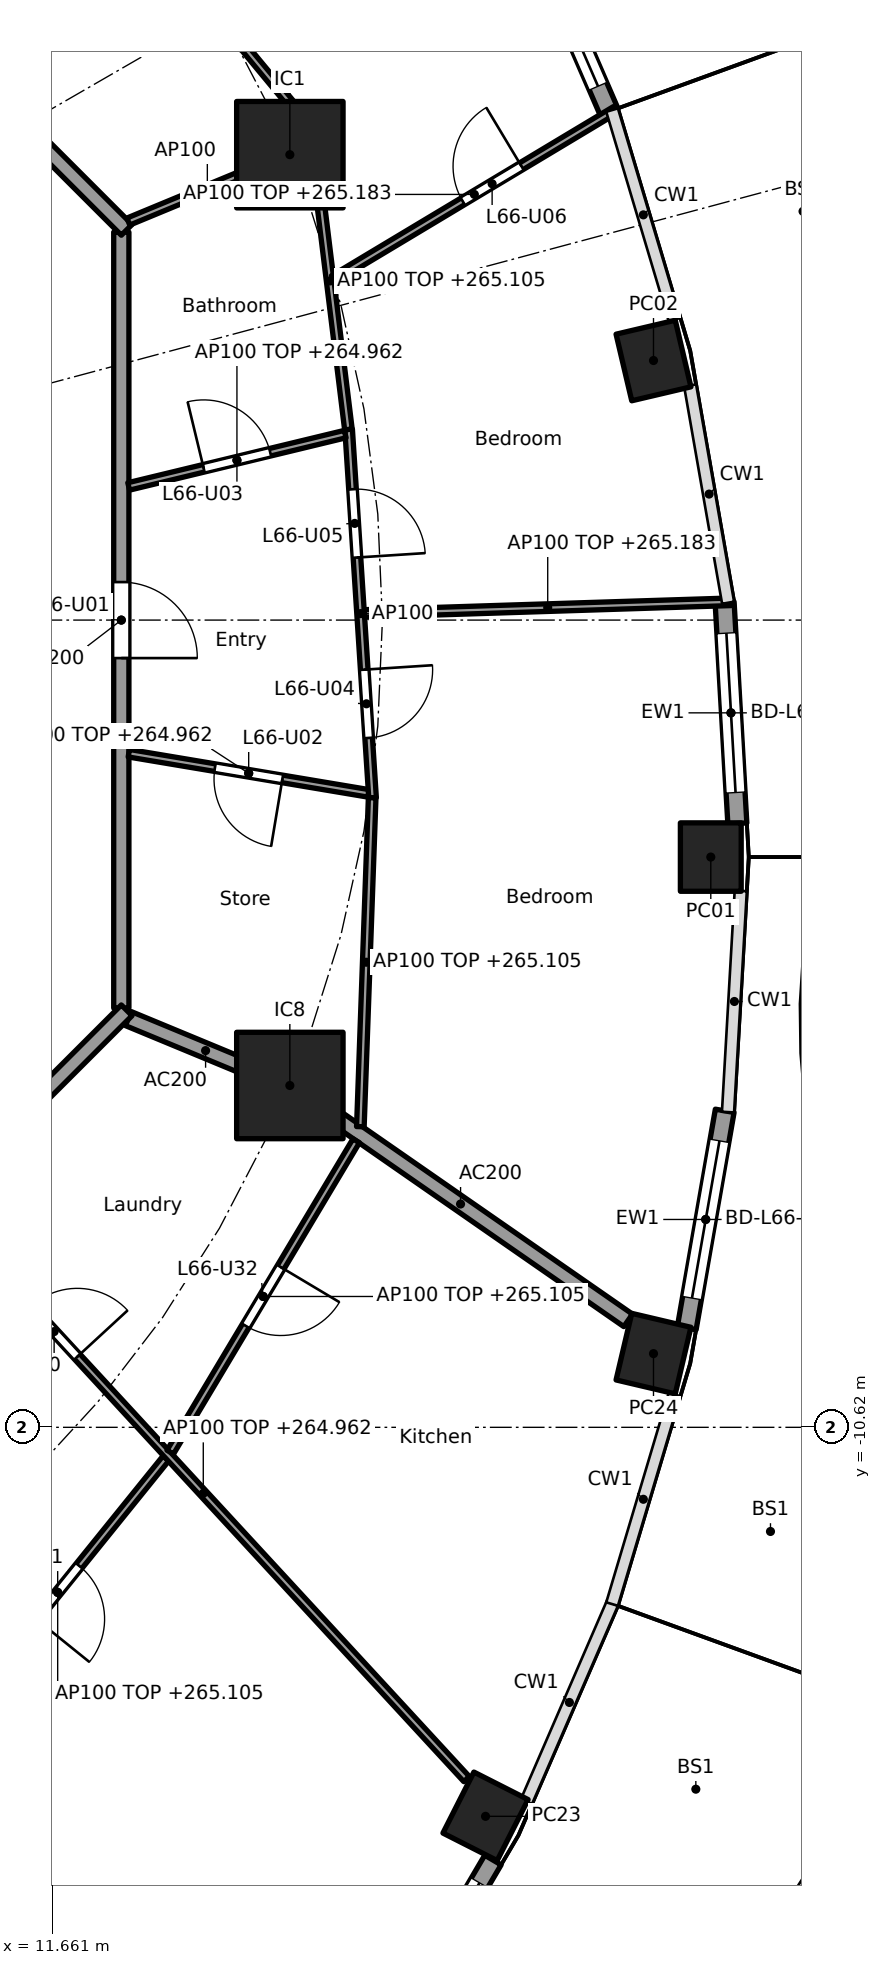
"""IFC4 building model, lengths in metres.
Left out: names, types, materials, properties, quantities, classifications, styles, units other than length and angle.
Written with IfcOpenShell. Run it as: python <this file> out.ifc"""

import sys

from ifc_helpers import new_model, si_unit, direction, frame, frame_2d, origin, origin_2d, place, context, subcontext, project, spatial, rectangle, hollow_rectangle, extrude, element, fill, save


model = new_model("IFC4")
c1 = context("Model", 3, precision=1e-05, world=origin(), true_north=direction((0.0, 1.0)))
c2 = subcontext(c1, "Body", "Model", "MODEL_VIEW")
j1 = project(units=[si_unit("LENGTHUNIT", "METRE"), si_unit("PLANEANGLEUNIT", "RADIAN")], contexts=[c1])
p1 = place(None, origin())
s1 = spatial("IfcSite", under=j1, at=p1, CompositionType="ELEMENT")
p2 = place(p1, origin())
s2 = spatial("IfcBuilding", under=s1, at=p2, CompositionType="ELEMENT")
p3 = place(p2, frame((0.0, 0.0, 262.2)))
s3 = spatial("IfcBuildingStorey", under=s2, at=p3, CompositionType="ELEMENT", Elevation=262.2)
for number, where, z_axis, x_axis in (
    (1, (20.32, -3.118, 0.0), (0.0, 0.0, 1.0), (0.0, 1.0, 0.0)),
    (2, (19.566, 3.415, 0.0), (0.0, 0.0, 1.0), (-0.229, 0.973, 0.0)),
    (3, (17.356, -15.738, 0.0), (0.0, 0.0, 1.0), (0.452, 0.892, 0.0)),
    (4, (19.566, -9.65, 0.0), (0.0, 0.0, 1.0), (0.229, 0.973, 0.0)),
):
    element("IfcColumn", number, at=place(p3, frame(where, z_axis=z_axis, x_axis=x_axis)), inside=s3, PredefinedType="COLUMN", context=c2, shape_type="SweptSolid", body=[
        extrude(hollow_rectangle(XDim=0.9, YDim=0.8, WallThickness=0.028, at=origin_2d()), origin(), (0.0, 0.0, 1.0), 3.7),
    ])
for number, where, z_axis, x_axis in (
    (5, (14.782, 6.123, 0.0), (0.0, 0.0, 1.0), (1.0, 0.0, 0.0)),
    (6, (14.782, -6.123, 0.0), (0.0, 0.0, 1.0), (1.0, 0.0, 0.0)),
):
    element("IfcColumn", number, at=place(p3, frame(where, z_axis=z_axis, x_axis=x_axis)), inside=s3, PredefinedType="COLUMN", context=c2, shape_type="SweptSolid", body=[
        extrude(rectangle(XDim=1.4, YDim=1.4, at=origin_2d()), origin(), (0.0, 0.0, 1.0), 3.7),
    ])
p4 = place(p3, frame((20.502, 0.235, 0.0), z_axis=(0.0, 0.0, 1.0), x_axis=(0.057533933376, -0.998343551344, 0.0)))
e7 = element("IfcWall", 7, at=p4, inside=s3, PredefinedType="SOLIDWALL", context=c2, shape_type="SweptSolid", body=[
    extrude(rectangle(XDim=2.915, YDim=0.25, at=frame_2d((1.458, 0.0))), origin(), (0.0, 0.0, 1.0), 3.44),
])
p5 = place(p4, frame((0.408, 0.0, 0.0)))
e8 = element("IfcOpeningElement", 8, at=p5, cuts=e7, PredefinedType="OPENING", context=c2, shape_type="SweptSolid", body=[
    extrude(rectangle(XDim=2.1, YDim=2.4, at=frame_2d((1.05, 1.2))), frame((0.0, 0.135, 0.0), z_axis=(0.0, -1.0, 0.0), x_axis=(1.0, 0.0, 0.0)), (0.0, 0.0, 1.0), 0.27),
])
p6 = place(p3, frame((17.854, 9.29, 0.0), z_axis=(0.0, 0.0, 1.0), x_axis=(0.397597791596, -0.9175598052, 0.0)))
e9 = element("IfcWall", 9, at=p6, inside=s3, PredefinedType="SOLIDWALL", context=c2, shape_type="SweptSolid", body=[
    extrude(rectangle(XDim=2.841, YDim=0.25, at=frame_2d((1.42, 0.0))), origin(), (0.0, 0.0, 1.0), 3.44),
])
p7 = place(p6, frame((0.371, 0.0, 0.0)))
e10 = element("IfcOpeningElement", 10, at=p7, cuts=e9, PredefinedType="OPENING", context=c2, shape_type="SweptSolid", body=[
    extrude(rectangle(XDim=2.1, YDim=2.4, at=frame_2d((1.05, 1.2))), frame((0.0, 0.135, 0.0), z_axis=(0.0, -1.0, 0.0), x_axis=(1.0, 0.0, 0.0)), (0.0, 0.0, 1.0), 0.27),
])
p8 = place(p3, frame((17.454, -16.312, 0.0), z_axis=(0.0, 0.0, 1.0), x_axis=(-0.506371364425, -0.862315511452, 0.0)))
e11 = element("IfcWall", 11, at=p8, inside=s3, PredefinedType="SOLIDWALL", context=c2, shape_type="SweptSolid", body=[
    extrude(rectangle(XDim=2.796, YDim=0.25, at=frame_2d((1.398, 0.0))), origin(), (0.0, 0.0, 1.0), 3.44),
])
p9 = place(p8, frame((0.348, 0.0, 0.0)))
e12 = element("IfcOpeningElement", 12, at=p9, cuts=e11, PredefinedType="OPENING", context=c2, shape_type="SweptSolid", body=[
    extrude(rectangle(XDim=2.1, YDim=2.4, at=frame_2d((1.05, 1.2))), frame((0.0, 0.135, 0.0), z_axis=(0.0, -1.0, 0.0), x_axis=(1.0, 0.0, 0.0)), (0.0, 0.0, 1.0), 0.27),
])
p10 = place(p3, frame((20.503, -6.456, 0.0), z_axis=(0.0, 0.0, 1.0), x_axis=(-0.172182411767, -0.985065082661, 0.0)))
e13 = element("IfcWall", 13, at=p10, inside=s3, PredefinedType="SOLIDWALL", context=c2, shape_type="SweptSolid", body=[
    extrude(rectangle(XDim=2.903, YDim=0.25, at=frame_2d((1.451, 0.0))), origin(), (0.0, 0.0, 1.0), 3.44),
])
p11 = place(p10, frame((0.401, 0.0, 0.0)))
e14 = element("IfcOpeningElement", 14, at=p11, cuts=e13, PredefinedType="OPENING", context=c2, shape_type="SweptSolid", body=[
    extrude(rectangle(XDim=2.1, YDim=2.4, at=frame_2d((1.05, 1.2))), frame((0.0, 0.135, 0.0), z_axis=(0.0, -1.0, 0.0), x_axis=(1.0, 0.0, 0.0)), (0.0, 0.0, 1.0), 0.27),
])
p12 = place(p3, frame((12.657, -5.243, 0.0), z_axis=(0.0, 0.0, 1.0), x_axis=(0.92383017907, -0.382802560388, 0.0)))
e15 = element("IfcWall", 15, at=p12, inside=s3, PredefinedType="PARTITIONING", context=c2, shape_type="SweptSolid", body=[
    extrude(rectangle(XDim=2.2, YDim=0.2, at=frame_2d((1.1, 0.0))), origin(), (0.0, 0.0, 1.0), 3.44),
])
p13 = place(p3, frame((14.823, -6.151, 0.0), z_axis=(0.0, 0.0, 1.0), x_axis=(0.821435065081, -0.570302054928, 0.0)))
e16 = element("IfcWall", 16, at=p13, inside=s3, PredefinedType="PARTITIONING", context=c2, shape_type="SweptSolid", body=[
    extrude(rectangle(XDim=5.368, YDim=0.2, at=frame_2d((2.684, 0.0))), origin(), (0.0, 0.0, 1.0), 3.44),
])
p14 = place(p3, frame((12.565, -5.104, 0.0), z_axis=(0.0, 0.0, 1.0), x_axis=(0.0, 1.0, 0.0)))
e17 = element("IfcWall", 17, at=p14, inside=s3, PredefinedType="PARTITIONING", context=c2, shape_type="SweptSolid", body=[
    extrude(rectangle(XDim=10.209, YDim=0.2, at=frame_2d((5.104, 0.0))), origin(), (0.0, 0.0, 1.0), 3.44),
])
p15 = place(p14, frame((4.604, 0.0, 0.0)))
e18 = element("IfcOpeningElement", 18, at=p15, cuts=e17, PredefinedType="OPENING", context=c2, shape_type="SweptSolid", body=[
    extrude(rectangle(XDim=1.0, YDim=2.1, at=frame_2d((0.5, 1.05))), frame((0.0, 0.11, 0.0), z_axis=(0.0, -1.0, 0.0), x_axis=(1.0, 0.0, 0.0)), (0.0, 0.0, 1.0), 0.22),
])
p16 = place(p3, frame((12.635, 5.134, 0.0), z_axis=(0.0, 0.0, 1.0), x_axis=(-0.707106781187, 0.707106781187, 0.0)))
e19 = element("IfcWall", 19, at=p16, inside=s3, PredefinedType="PARTITIONING", context=c2, shape_type="SweptSolid", body=[
    extrude(rectangle(XDim=10.609, YDim=0.2, at=frame_2d((5.305, 0.0))), origin(), (0.0, 0.0, 1.0), 3.44),
])
p17 = place(p3, frame((5.275, -12.494, 0.0), z_axis=(0.0, 0.0, 1.0), x_axis=(0.707106781187, 0.707106781187, 0.0)))
e20 = element("IfcWall", 20, at=p17, inside=s3, PredefinedType="PARTITIONING", context=c2, shape_type="SweptSolid", body=[
    extrude(rectangle(XDim=10.409, YDim=0.2, at=frame_2d((5.205, 0.0))), origin(), (0.0, 0.0, 1.0), 3.44),
])
p18 = place(p17, frame((4.604, 0.0, 0.0)))
e21 = element("IfcOpeningElement", 21, at=p18, cuts=e20, PredefinedType="OPENING", context=c2, shape_type="SweptSolid", body=[
    extrude(rectangle(XDim=1.0, YDim=2.1, at=frame_2d((0.5, 1.05))), frame((0.0, 0.11, 0.0), z_axis=(0.0, -1.0, 0.0), x_axis=(1.0, 0.0, 0.0)), (0.0, 0.0, 1.0), 0.22),
])
p19 = place(p3, frame((12.663, -1.751, 0.0), z_axis=(0.0, 0.0, 1.0), x_axis=(0.98626156497, -0.165191178529, 0.0)))
e22 = element("IfcWall", 22, at=p19, inside=s3, PredefinedType="PARTITIONING", context=c2, shape_type="SweptSolid", body=[
    extrude(rectangle(XDim=3.198, YDim=0.1, at=frame_2d((1.599, 0.0))), origin(), (0.0, 0.0, 1.0), 2.762),
])
p20 = place(p19, frame((1.149, 0.0, 0.0)))
e23 = element("IfcOpeningElement", 23, at=p20, cuts=e22, PredefinedType="OPENING", context=c2, shape_type="SweptSolid", body=[
    extrude(rectangle(XDim=0.9, YDim=2.1, at=frame_2d((0.45, 1.05))), frame((0.0, 0.06, 0.0), z_axis=(0.0, -1.0, 0.0), x_axis=(1.0, 0.0, 0.0)), (0.0, 0.0, 1.0), 0.12),
])
p21 = place(p3, frame((15.87, -2.338, 0.0), z_axis=(0.0, 0.0, 1.0), x_axis=(-0.064797294757, 0.997898447034, 0.0)))
e24 = element("IfcWall", 24, at=p21, inside=s3, PredefinedType="PARTITIONING", context=c2, shape_type="SweptSolid", body=[
    extrude(rectangle(XDim=4.857, YDim=0.1, at=frame_2d((2.428, 0.0))), origin(), (0.0, 0.0, 1.0), 3.44),
])
p22 = place(p21, frame((0.789, 0.0, 0.0)))
e25 = element("IfcOpeningElement", 25, at=p22, cuts=e24, PredefinedType="OPENING", context=c2, shape_type="SweptSolid", body=[
    extrude(rectangle(XDim=0.9, YDim=2.1, at=frame_2d((0.45, 1.05))), frame((0.0, 0.06, 0.0), z_axis=(0.0, -1.0, 0.0), x_axis=(1.0, 0.0, 0.0)), (0.0, 0.0, 1.0), 0.12),
])
p23 = place(p21, frame((3.167, 0.0, 0.0)))
e26 = element("IfcOpeningElement", 26, at=p23, cuts=e24, PredefinedType="OPENING", context=c2, shape_type="SweptSolid", body=[
    extrude(rectangle(XDim=0.9, YDim=2.1, at=frame_2d((0.45, 1.05))), frame((0.0, 0.06, 0.0), z_axis=(0.0, -1.0, 0.0), x_axis=(1.0, 0.0, 0.0)), (0.0, 0.0, 1.0), 0.12),
])
p24 = place(p3, frame((15.865, -2.338, 0.0), z_axis=(0.0, 0.0, 1.0), x_axis=(-0.035864509465, -0.999356661538, 0.0)))
e27 = element("IfcWall", 27, at=p24, inside=s3, PredefinedType="PARTITIONING", context=c2, shape_type="SweptSolid", body=[
    extrude(rectangle(XDim=4.329, YDim=0.1, at=frame_2d((2.165, 0.0))), origin(), (0.0, 0.0, 1.0), 2.905),
])
p25 = place(p3, frame((15.763, 0.087, 0.0), z_axis=(0.0, 0.0, 1.0), x_axis=(0.999492034598, 0.03186962151, 0.0)))
e28 = element("IfcWall", 28, at=p25, inside=s3, PredefinedType="PARTITIONING", context=c2, shape_type="SweptSolid", body=[
    extrude(rectangle(XDim=4.826, YDim=0.1, at=frame_2d((2.413, 0.0))), origin(), (0.0, 0.0, 1.0), 2.983),
])
p26 = place(p3, frame((12.662, 1.758, 0.0), z_axis=(0.0, 0.0, 1.0), x_axis=(0.972004827836, 0.234960879007, 0.0)))
e29 = element("IfcWall", 29, at=p26, inside=s3, PredefinedType="PARTITIONING", context=c2, shape_type="SweptSolid", body=[
    extrude(rectangle(XDim=2.93, YDim=0.1, at=frame_2d((1.465, 0.0))), origin(), (0.0, 0.0, 1.0), 2.762),
])
p27 = place(p26, frame((1.015, 0.0, 0.0)))
e30 = element("IfcOpeningElement", 30, at=p27, cuts=e29, PredefinedType="OPENING", context=c2, shape_type="SweptSolid", body=[
    extrude(rectangle(XDim=0.9, YDim=2.1, at=frame_2d((0.45, 1.05))), frame((0.0, 0.06, 0.0), z_axis=(0.0, -1.0, 0.0), x_axis=(1.0, 0.0, 0.0)), (0.0, 0.0, 1.0), 0.12),
])
p28 = place(p3, frame((15.552, 2.508, 0.0), z_axis=(0.0, 0.0, 1.0), x_axis=(-0.12196631785, 0.992534239868, 0.0)))
e31 = element("IfcWall", 31, at=p28, inside=s3, PredefinedType="PARTITIONING", context=c2, shape_type="SweptSolid", body=[
    extrude(rectangle(XDim=3.937, YDim=0.1, at=frame_2d((1.969, 0.0))), origin(), (0.0, 0.0, 1.0), 2.905),
])
p29 = place(p3, frame((15.355, 4.488, 0.0), z_axis=(0.0, 0.0, 1.0), x_axis=(0.85763237524, 0.514263268123, 0.0)))
e32 = element("IfcWall", 32, at=p29, inside=s3, PredefinedType="PARTITIONING", context=c2, shape_type="SweptSolid", body=[
    extrude(rectangle(XDim=4.324, YDim=0.1, at=frame_2d((2.162, 0.0))), origin(), (0.0, 0.0, 1.0), 2.983),
])
p30 = place(p29, frame((1.985, 0.0, 0.0)))
e33 = element("IfcOpeningElement", 33, at=p30, cuts=e32, PredefinedType="OPENING", context=c2, shape_type="SweptSolid", body=[
    extrude(rectangle(XDim=0.9, YDim=2.1, at=frame_2d((0.45, 1.05))), frame((0.0, 0.06, 0.0), z_axis=(0.0, -1.0, 0.0), x_axis=(1.0, 0.0, 0.0)), (0.0, 0.0, 1.0), 0.12),
])
p31 = place(p3, frame((12.657, 5.243, 0.0), z_axis=(0.0, 0.0, 1.0), x_axis=(0.923864733477, 0.382719158442, 0.0)))
e34 = element("IfcWall", 34, at=p31, inside=s3, PredefinedType="PARTITIONING", context=c2, shape_type="SweptSolid", body=[
    extrude(rectangle(XDim=2.25, YDim=0.1, at=frame_2d((1.125, 0.0))), origin(), (0.0, 0.0, 1.0), 3.44),
])
p32 = place(p3, frame((15.098, 6.427, 0.0), z_axis=(0.0, 0.0, 1.0), x_axis=(-0.637936555536, 0.770088924158, 0.0)))
e35 = element("IfcWall", 35, at=p32, inside=s3, PredefinedType="PARTITIONING", context=c2, shape_type="SweptSolid", body=[
    extrude(rectangle(XDim=6.46, YDim=0.1, at=frame_2d((3.23, 0.0))), origin(), (0.0, 0.0, 1.0), 2.905),
])
p33 = place(p32, frame((2.78, 0.0, 0.0)))
e36 = element("IfcOpeningElement", 36, at=p33, cuts=e35, PredefinedType="OPENING", context=c2, shape_type="SweptSolid", body=[
    extrude(rectangle(XDim=0.9, YDim=2.1, at=frame_2d((0.45, 1.05))), frame((0.0, 0.06, 0.0), z_axis=(0.0, -1.0, 0.0), x_axis=(1.0, 0.0, 0.0)), (0.0, 0.0, 1.0), 0.12),
])
p34 = place(p3, frame((8.677, -16.173, 0.0), z_axis=(0.0, 0.0, 1.0), x_axis=(0.408174671437, -0.912903849043, 0.0)))
e37 = element("IfcWall", 37, at=p34, inside=s3, PredefinedType="PARTITIONING", context=c2, shape_type="SweptSolid", body=[
    extrude(rectangle(XDim=8.028, YDim=0.1, at=frame_2d((4.014, 0.0))), origin(), (0.0, 0.0, 1.0), 2.983),
])
p35 = place(p3, frame((10.304, -14.555, 0.0), z_axis=(0.0, 0.0, 1.0), x_axis=(0.628170338674, 0.778075848237, 0.0)))
e38 = element("IfcWall", 38, at=p35, inside=s3, PredefinedType="PARTITIONING", context=c2, shape_type="SweptSolid", body=[
    extrude(rectangle(XDim=4.532, YDim=0.1, at=frame_2d((2.266, 0.0))), origin(), (0.0, 0.0, 1.0), 2.905),
])
p36 = place(p35, frame((1.816, 0.0, 0.0)))
e39 = element("IfcOpeningElement", 39, at=p36, cuts=e38, PredefinedType="OPENING", context=c2, shape_type="SweptSolid", body=[
    extrude(rectangle(XDim=0.9, YDim=2.1, at=frame_2d((0.45, 1.05))), frame((0.0, 0.06, 0.0), z_axis=(0.0, -1.0, 0.0), x_axis=(1.0, 0.0, 0.0)), (0.0, 0.0, 1.0), 0.12),
])
p37 = place(p3, frame((10.179, -7.731, 0.0), z_axis=(0.0, 0.0, 1.0), x_axis=(0.67775318564, -0.73528947997, 0.0)))
e40 = element("IfcWall", 40, at=p37, inside=s3, PredefinedType="PARTITIONING", context=c2, shape_type="SweptSolid", body=[
    extrude(rectangle(XDim=10.222, YDim=0.1, at=frame_2d((5.111, 0.0))), origin(), (0.0, 0.0, 1.0), 2.762),
])
p38 = place(p37, frame((1.766, 0.0, 0.0)))
e41 = element("IfcOpeningElement", 41, at=p38, cuts=e40, PredefinedType="OPENING", context=c2, shape_type="SweptSolid", body=[
    extrude(rectangle(XDim=0.9, YDim=2.1, at=frame_2d((0.45, 1.05))), frame((0.0, 0.06, 0.0), z_axis=(0.0, -1.0, 0.0), x_axis=(1.0, 0.0, 0.0)), (0.0, 0.0, 1.0), 0.12),
])
p39 = place(p3, frame((13.208, -10.947, 0.0), z_axis=(0.0, 0.0, 1.0), x_axis=(0.512726452516, 0.858552028063, 0.0)))
e42 = element("IfcWall", 42, at=p39, inside=s3, PredefinedType="PARTITIONING", context=c2, shape_type="SweptSolid", body=[
    extrude(rectangle(XDim=4.772, YDim=0.1, at=frame_2d((2.386, 0.0))), origin(), (0.0, 0.0, 1.0), 2.905),
])
p40 = place(p39, frame((1.936, 0.0, 0.0)))
e43 = element("IfcOpeningElement", 43, at=p40, cuts=e42, PredefinedType="OPENING", context=c2, shape_type="SweptSolid", body=[
    extrude(rectangle(XDim=0.9, YDim=2.1, at=frame_2d((0.45, 1.05))), frame((0.0, 0.06, 0.0), z_axis=(0.0, -1.0, 0.0), x_axis=(1.0, 0.0, 0.0)), (0.0, 0.0, 1.0), 0.12),
])
p41 = place(p5, origin())
e44 = element("IfcDoor", 44, at=p41, inside=s3, OperationType="SLIDING_TO_LEFT", PredefinedType="DOOR", context=c2, shape_type="SweptSolid", body=[
    extrude(rectangle(XDim=2.1, YDim=2.4, at=frame_2d((1.05, 1.2))), frame((0.0, 0.025, 0.0), z_axis=(0.0, -1.0, 0.0), x_axis=(1.0, 0.0, 0.0)), (0.0, 0.0, 1.0), 0.05),
])
fill(e8, e44)
p42 = place(p7, origin())
e45 = element("IfcDoor", 45, at=p42, inside=s3, OperationType="SLIDING_TO_LEFT", PredefinedType="DOOR", context=c2, shape_type="SweptSolid", body=[
    extrude(rectangle(XDim=2.1, YDim=2.4, at=frame_2d((1.05, 1.2))), frame((0.0, 0.025, 0.0), z_axis=(0.0, -1.0, 0.0), x_axis=(1.0, 0.0, 0.0)), (0.0, 0.0, 1.0), 0.05),
])
fill(e10, e45)
p43 = place(p9, origin())
e46 = element("IfcDoor", 46, at=p43, inside=s3, OperationType="SLIDING_TO_LEFT", PredefinedType="DOOR", context=c2, shape_type="SweptSolid", body=[
    extrude(rectangle(XDim=2.1, YDim=2.4, at=frame_2d((1.05, 1.2))), frame((0.0, 0.025, 0.0), z_axis=(0.0, -1.0, 0.0), x_axis=(1.0, 0.0, 0.0)), (0.0, 0.0, 1.0), 0.05),
])
fill(e12, e46)
p44 = place(p11, origin())
e47 = element("IfcDoor", 47, at=p44, inside=s3, OperationType="SLIDING_TO_LEFT", PredefinedType="DOOR", context=c2, shape_type="SweptSolid", body=[
    extrude(rectangle(XDim=2.1, YDim=2.4, at=frame_2d((1.05, 1.2))), frame((0.0, 0.025, 0.0), z_axis=(0.0, -1.0, 0.0), x_axis=(1.0, 0.0, 0.0)), (0.0, 0.0, 1.0), 0.05),
])
fill(e14, e47)
p45 = place(p15, frame((1.0, 0.0, 0.0), x_axis=(-1.0, 0.0, 0.0)))
e48 = element("IfcDoor", 48, at=p45, inside=s3, OperationType="SINGLE_SWING_RIGHT", PredefinedType="DOOR", context=c2, shape_type="SweptSolid", body=[
    extrude(rectangle(XDim=1.0, YDim=2.1, at=frame_2d((0.5, 1.05))), frame((0.0, 0.025, 0.0), z_axis=(0.0, -1.0, 0.0), x_axis=(1.0, 0.0, 0.0)), (0.0, 0.0, 1.0), 0.05),
])
fill(e18, e48)
p46 = place(p20, frame((0.9, 0.0, 0.0), x_axis=(-1.0, 0.0, 0.0)))
e49 = element("IfcDoor", 49, at=p46, inside=s3, OperationType="SINGLE_SWING_LEFT", PredefinedType="DOOR", context=c2, shape_type="SweptSolid", body=[
    extrude(rectangle(XDim=0.9, YDim=2.1, at=frame_2d((0.45, 1.05))), frame((0.0, 0.025, 0.0), z_axis=(0.0, -1.0, 0.0), x_axis=(1.0, 0.0, 0.0)), (0.0, 0.0, 1.0), 0.05),
])
fill(e23, e49)
p47 = place(p27, origin())
e50 = element("IfcDoor", 50, at=p47, inside=s3, OperationType="SINGLE_SWING_LEFT", PredefinedType="DOOR", context=c2, shape_type="SweptSolid", body=[
    extrude(rectangle(XDim=0.9, YDim=2.1, at=frame_2d((0.45, 1.05))), frame((0.0, 0.025, 0.0), z_axis=(0.0, -1.0, 0.0), x_axis=(1.0, 0.0, 0.0)), (0.0, 0.0, 1.0), 0.05),
])
fill(e30, e50)
p48 = place(p22, frame((0.9, 0.0, 0.0), x_axis=(-1.0, 0.0, 0.0)))
e51 = element("IfcDoor", 51, at=p48, inside=s3, OperationType="SINGLE_SWING_LEFT", PredefinedType="DOOR", context=c2, shape_type="SweptSolid", body=[
    extrude(rectangle(XDim=0.9, YDim=2.1, at=frame_2d((0.45, 1.05))), frame((0.0, 0.025, 0.0), z_axis=(0.0, -1.0, 0.0), x_axis=(1.0, 0.0, 0.0)), (0.0, 0.0, 1.0), 0.05),
])
fill(e25, e51)
p49 = place(p23, frame((0.9, 0.0, 0.0), x_axis=(-1.0, 0.0, 0.0)))
e52 = element("IfcDoor", 52, at=p49, inside=s3, OperationType="SINGLE_SWING_RIGHT", PredefinedType="DOOR", context=c2, shape_type="SweptSolid", body=[
    extrude(rectangle(XDim=0.9, YDim=2.1, at=frame_2d((0.45, 1.05))), frame((0.0, 0.025, 0.0), z_axis=(0.0, -1.0, 0.0), x_axis=(1.0, 0.0, 0.0)), (0.0, 0.0, 1.0), 0.05),
])
fill(e26, e52)
p50 = place(p30, origin())
e53 = element("IfcDoor", 53, at=p50, inside=s3, OperationType="SINGLE_SWING_RIGHT", PredefinedType="DOOR", context=c2, shape_type="SweptSolid", body=[
    extrude(rectangle(XDim=0.9, YDim=2.1, at=frame_2d((0.45, 1.05))), frame((0.0, 0.025, 0.0), z_axis=(0.0, -1.0, 0.0), x_axis=(1.0, 0.0, 0.0)), (0.0, 0.0, 1.0), 0.05),
])
fill(e33, e53)
p51 = place(p38, origin())
e54 = element("IfcDoor", 54, at=p51, inside=s3, OperationType="SINGLE_SWING_RIGHT", PredefinedType="DOOR", context=c2, shape_type="SweptSolid", body=[
    extrude(rectangle(XDim=0.9, YDim=2.1, at=frame_2d((0.45, 1.05))), frame((0.0, 0.025, 0.0), z_axis=(0.0, -1.0, 0.0), x_axis=(1.0, 0.0, 0.0)), (0.0, 0.0, 1.0), 0.05),
])
fill(e41, e54)
p52 = place(p36, frame((0.9, 0.0, 0.0), x_axis=(-1.0, 0.0, 0.0)))
e55 = element("IfcDoor", 55, at=p52, inside=s3, OperationType="SINGLE_SWING_RIGHT", PredefinedType="DOOR", context=c2, shape_type="SweptSolid", body=[
    extrude(rectangle(XDim=0.9, YDim=2.1, at=frame_2d((0.45, 1.05))), frame((0.0, 0.025, 0.0), z_axis=(0.0, -1.0, 0.0), x_axis=(1.0, 0.0, 0.0)), (0.0, 0.0, 1.0), 0.05),
])
fill(e39, e55)
p53 = place(p40, frame((0.9, 0.0, 0.0), x_axis=(-1.0, 0.0, 0.0)))
e56 = element("IfcDoor", 56, at=p53, inside=s3, OperationType="SINGLE_SWING_LEFT", PredefinedType="DOOR", context=c2, shape_type="SweptSolid", body=[
    extrude(rectangle(XDim=0.9, YDim=2.1, at=frame_2d((0.45, 1.05))), frame((0.0, 0.025, 0.0), z_axis=(0.0, -1.0, 0.0), x_axis=(1.0, 0.0, 0.0)), (0.0, 0.0, 1.0), 0.05),
])
fill(e43, e56)
save(model, sys.argv[1])
